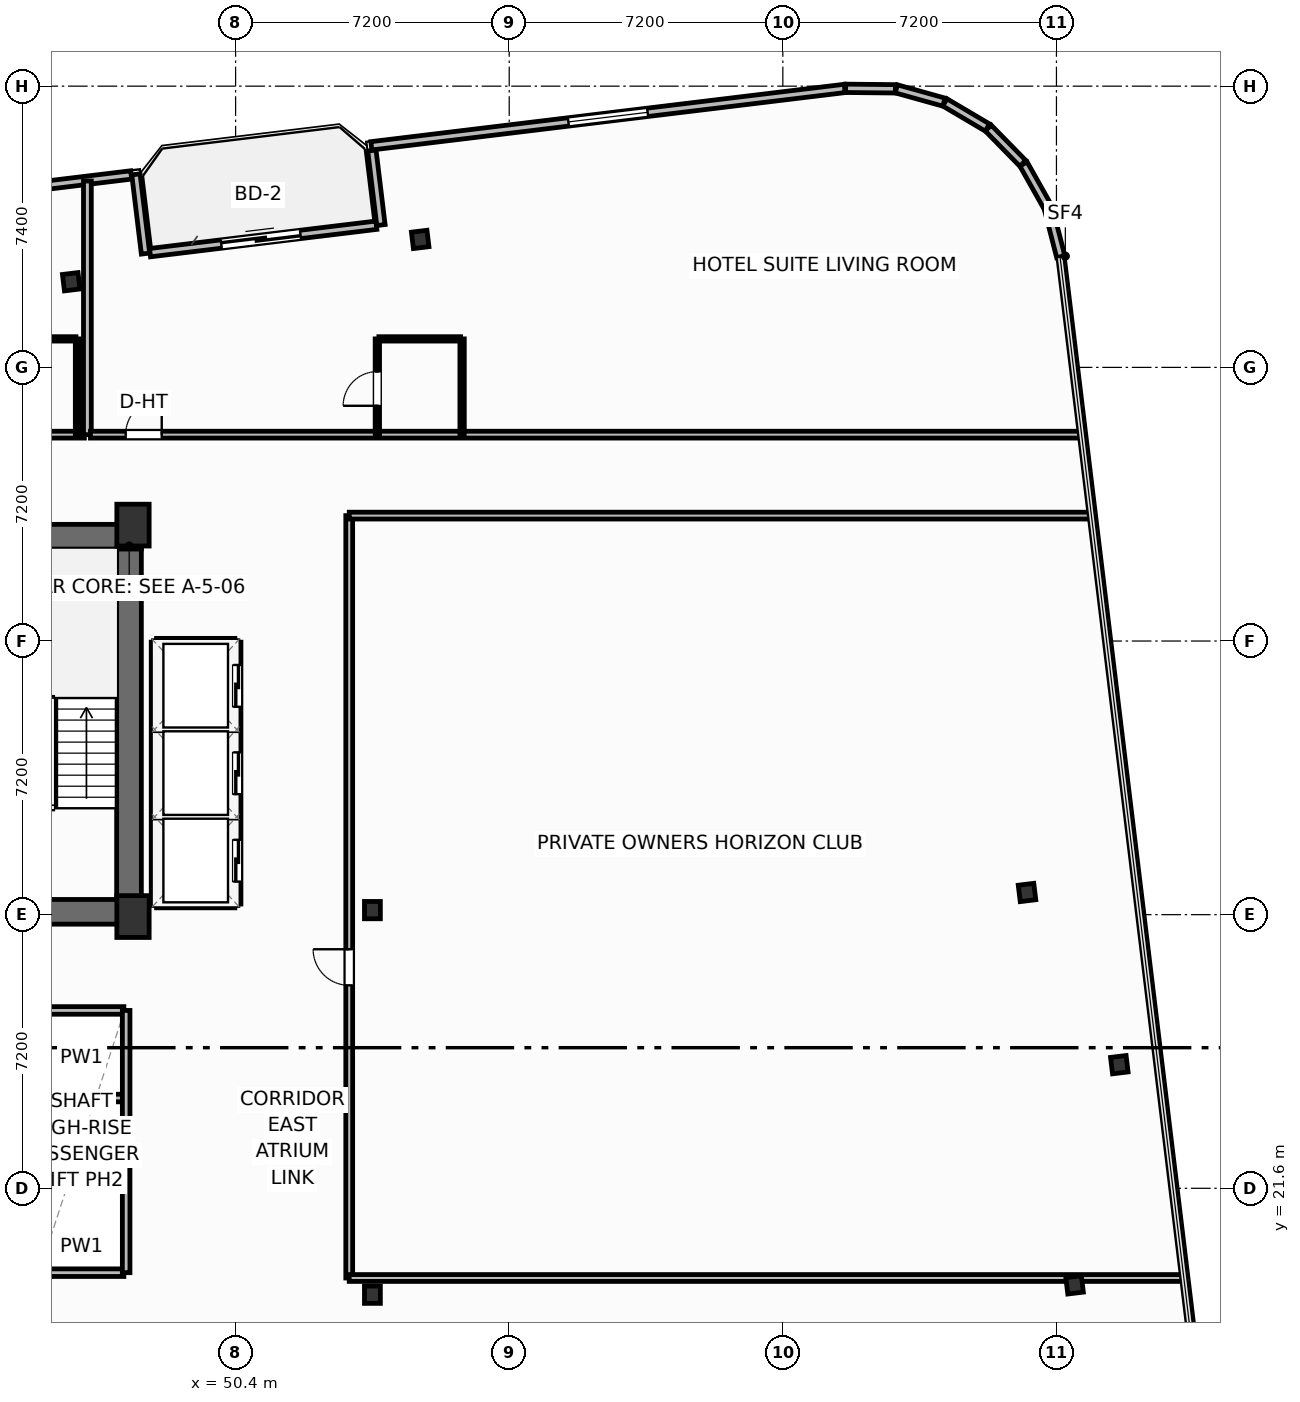
"""IFC4 building model, lengths in metres.
Left out: names, types, materials, properties, quantities, classifications, styles, units other than length and angle.
Written with IfcOpenShell. Run it as: python <this file> out.ifc"""

import sys

from ifc_helpers import new_model, si_unit, direction, frame, frame_2d, origin, origin_2d, place, context, subcontext, project, spatial, rectangle, i_section, extrude, element, fill, save


model = new_model("IFC4")
c1 = context("Model", 3, precision=1e-05, world=origin(), true_north=direction((0.0, 1.0)))
c2 = subcontext(c1, "Body", "Model", "MODEL_VIEW")
j1 = project(units=[si_unit("LENGTHUNIT", "METRE"), si_unit("PLANEANGLEUNIT", "RADIAN")], contexts=[c1])
p1 = place(None, origin())
s1 = spatial("IfcSite", under=j1, at=p1, CompositionType="ELEMENT")
p2 = place(p1, origin())
s2 = spatial("IfcBuilding", under=s1, at=p2, CompositionType="ELEMENT")
p3 = place(p2, frame((0.0, 0.0, 170.9)))
s3 = spatial("IfcBuildingStorey", under=s2, at=p3, CompositionType="ELEMENT", Elevation=170.9)
for number, where, z_axis, x_axis in (
    (1, (47.7, 28.75, 0.0), (0.0, 0.0, 1.0), (1.0, 0.0, 0.0)),
    (2, (47.7, 39.05, 0.0), (0.0, 0.0, 1.0), (1.0, 0.0, 0.0)),
):
    element("IfcColumn", number, at=place(p3, frame(where, z_axis=z_axis, x_axis=x_axis)), inside=s3, PredefinedType="COLUMN", context=c2, shape_type="SweptSolid", body=[
        extrude(rectangle(XDim=0.85, YDim=1.1, at=origin_2d()), origin(), (0.0, 0.0, 1.0), 3.7),
    ])
for number, where, z_axis, x_axis in (
    (3, (54.0, 18.8, 0.0), (0.0, 0.0, 1.0), (1.0, 0.0, 0.0)),
    (4, (54.0, 28.92, 0.0), (0.0, 0.0, 1.0), (1.0, 0.0, 0.0)),
):
    element("IfcColumn", number, at=place(p3, frame(where, z_axis=z_axis, x_axis=x_axis)), inside=s3, PredefinedType="COLUMN", context=c2, shape_type="SweptSolid", body=[
        extrude(i_section(OverallWidth=0.418, OverallDepth=0.455, WebThickness=0.042, FlangeThickness=0.068, FilletRadius=0.025, at=origin_2d()), origin(), (0.0, 0.0, 1.0), 3.7),
    ])
p4 = place(p3, frame((30.48, 38.745, 0.0), z_axis=(0.0, 0.0, 1.0), x_axis=(1.0, 0.0, 0.0)))
e5 = element("IfcWall", 5, at=p4, inside=s3, PredefinedType="SHEAR", context=c2, shape_type="SweptSolid", body=[
    extrude(rectangle(XDim=17.44, YDim=0.65, at=frame_2d((8.72, 0.0))), origin(), (0.0, 0.0, 1.0), 3.45),
])
p5 = place(p3, frame((47.595, 29.2, 0.0), z_axis=(0.0, 0.0, 1.0), x_axis=(0.0, 1.0, 0.0)))
e6 = element("IfcWall", 6, at=p5, inside=s3, PredefinedType="SHEAR", context=c2, shape_type="SweptSolid", body=[
    extrude(rectangle(XDim=9.22, YDim=0.65, at=frame_2d((4.61, 0.0))), origin(), (0.0, 0.0, 1.0), 3.45),
])
p6 = place(p3, frame((43.6, 28.875, 0.0), z_axis=(0.0, 0.0, 1.0), x_axis=(1.0, 0.0, 0.0)))
e7 = element("IfcWall", 7, at=p6, inside=s3, PredefinedType="SHEAR", context=c2, shape_type="SweptSolid", body=[
    extrude(rectangle(XDim=4.32, YDim=0.65, at=frame_2d((2.16, 0.0))), origin(), (0.0, 0.0, 1.0), 3.45),
])
for number, where, z_axis, x_axis in (
    (8, (72.477, 19.059, 0.0), (0.0, 0.0, 1.0), (0.993, 0.12, 0.0)),
    (9, (73.654, 24.853, 0.0), (0.0, 0.0, 1.0), (0.993, 0.12, 0.0)),
    (10, (71.225, 29.384, 0.0), (0.0, 0.0, 1.0), (0.993, 0.12, 0.0)),
    (11, (55.257, 46.567, 0.0), (0.0, 0.0, 1.0), (0.993, 0.12, 0.0)),
    (12, (46.075, 45.454, 0.0), (0.0, 0.0, 1.0), (0.993, 0.12, 0.0)),
):
    element("IfcColumn", number, at=place(p3, frame(where, z_axis=z_axis, x_axis=x_axis)), inside=s3, PredefinedType="COLUMN", context=c2, shape_type="SweptSolid", body=[
        extrude(i_section(OverallWidth=0.412, OverallDepth=0.435, WebThickness=0.036, FlangeThickness=0.057, FilletRadius=0.025, at=origin_2d()), origin(), (0.0, 0.0, 1.0), 3.7),
    ])
p7 = place(p3, frame((48.148, 46.219, 0.0), z_axis=(0.0, 0.0, 1.0), x_axis=(0.992729951822, 0.120362962556, 0.0)))
e13 = element("IfcWall", 13, at=p7, inside=s3, PredefinedType="SOLIDWALL", context=c2, shape_type="SweptSolid", body=[
    extrude(rectangle(XDim=6.0, YDim=0.22, at=frame_2d((3.0, 0.0))), origin(), (0.0, 0.0, 1.0), 2.73),
])
p8 = place(p7, frame((1.888, 0.0, 0.0)))
e14 = element("IfcOpeningElement", 14, at=p8, cuts=e13, PredefinedType="OPENING", context=c2, shape_type="SweptSolid", body=[
    extrude(rectangle(XDim=2.1, YDim=2.3, at=frame_2d((1.05, 1.15))), frame((0.0, 0.12, 0.0), z_axis=(0.0, -1.0, 0.0), x_axis=(1.0, 0.0, 0.0)), (0.0, 0.0, 1.0), 0.24),
])
p9 = place(p3, frame((72.114, 46.112, 0.0), z_axis=(0.0, 0.0, 1.0), x_axis=(-0.248942347653, 0.968518305219, 0.0)))
e15 = element("IfcWall", 15, at=p9, inside=s3, PredefinedType="SOLIDWALL", context=c2, shape_type="SweptSolid", body=[
    extrude(rectangle(XDim=1.326, YDim=0.22, at=frame_2d((0.663, 0.0))), origin(), (0.0, 0.0, 1.0), 2.73),
])
p10 = place(p3, frame((71.771, 47.418, 0.0), z_axis=(0.0, 0.0, 1.0), x_axis=(-0.491098509465, 0.871104043155, 0.0)))
e16 = element("IfcWall", 16, at=p10, inside=s3, PredefinedType="SOLIDWALL", context=c2, shape_type="SweptSolid", body=[
    extrude(rectangle(XDim=1.301, YDim=0.22, at=frame_2d((0.65, 0.0))), origin(), (0.0, 0.0, 1.0), 2.73),
])
p11 = place(p3, frame((71.115, 48.569, 0.0), z_axis=(0.0, 0.0, 1.0), x_axis=(-0.699844331926, 0.714295394827, 0.0)))
e17 = element("IfcWall", 17, at=p11, inside=s3, PredefinedType="SOLIDWALL", context=c2, shape_type="SweptSolid", body=[
    extrude(rectangle(XDim=1.301, YDim=0.22, at=frame_2d((0.65, 0.0))), origin(), (0.0, 0.0, 1.0), 2.73),
])
p12 = place(p3, frame((70.183, 49.511, 0.0), z_axis=(0.0, 0.0, 1.0), x_axis=(-0.860933999601, 0.508716668029, 0.0)))
e18 = element("IfcWall", 18, at=p12, inside=s3, PredefinedType="SOLIDWALL", context=c2, shape_type="SweptSolid", body=[
    extrude(rectangle(XDim=1.301, YDim=0.22, at=frame_2d((0.65, 0.0))), origin(), (0.0, 0.0, 1.0), 2.73),
])
p13 = place(p3, frame((69.039, 50.18, 0.0), z_axis=(0.0, 0.0, 1.0), x_axis=(-0.963205341366, 0.26876657226, 0.0)))
e19 = element("IfcWall", 19, at=p13, inside=s3, PredefinedType="SOLIDWALL", context=c2, shape_type="SweptSolid", body=[
    extrude(rectangle(XDim=1.301, YDim=0.22, at=frame_2d((0.65, 0.0))), origin(), (0.0, 0.0, 1.0), 2.73),
])
p14 = place(p3, frame((67.761, 50.53, 0.0), z_axis=(0.0, 0.0, 1.0), x_axis=(-0.999947358106, 0.010260653861, 0.0)))
e20 = element("IfcWall", 20, at=p14, inside=s3, PredefinedType="SOLIDWALL", context=c2, shape_type="SweptSolid", body=[
    extrude(rectangle(XDim=1.309, YDim=0.22, at=frame_2d((0.654, 0.0))), origin(), (0.0, 0.0, 1.0), 2.73),
])
p15 = place(p3, frame((66.427, 50.54, 0.0), z_axis=(0.0, 0.0, 1.0), x_axis=(-0.992731739233, -0.120348219431, 0.0)))
e21 = element("IfcWall", 21, at=p15, inside=s3, PredefinedType="SOLIDWALL", context=c2, shape_type="SweptSolid", body=[
    extrude(rectangle(XDim=12.547, YDim=0.22, at=frame_2d((6.273, 0.0))), origin(), (0.0, 0.0, 1.0), 2.73),
])
p16 = place(p15, frame((5.224, 0.0, 0.8)))
e22 = element("IfcOpeningElement", 22, at=p16, cuts=e21, PredefinedType="OPENING", context=c2, shape_type="SweptSolid", body=[
    extrude(rectangle(XDim=2.1, YDim=1.75, at=frame_2d((1.05, 0.875))), frame((0.0, 0.12, 0.0), z_axis=(0.0, -1.0, 0.0), x_axis=(1.0, 0.0, 0.0)), (0.0, 0.0, 1.0), 0.24),
])
p17 = place(p3, frame((53.987, 48.906, 0.0), z_axis=(0.0, 0.0, 1.0), x_axis=(0.120397815541, -0.992725725472, 0.0)))
e23 = element("IfcWall", 23, at=p17, inside=s3, PredefinedType="SOLIDWALL", context=c2, shape_type="SweptSolid", body=[
    extrude(rectangle(XDim=1.975, YDim=0.22, at=frame_2d((0.988, 0.0))), origin(), (0.0, 0.0, 1.0), 2.73),
])
p18 = place(p3, frame((48.03, 46.194, 0.0), z_axis=(0.0, 0.0, 1.0), x_axis=(-0.120314009587, 0.992735885871, 0.0)))
e24 = element("IfcWall", 24, at=p18, inside=s3, PredefinedType="SOLIDWALL", context=c2, shape_type="SweptSolid", body=[
    extrude(rectangle(XDim=2.1, YDim=0.22, at=frame_2d((1.05, 0.0))), origin(), (0.0, 0.0, 1.0), 2.73),
])
p19 = place(p3, frame((47.653, 48.264, 0.0), z_axis=(0.0, 0.0, 1.0), x_axis=(-0.992731032022, -0.120354052946, 0.0)))
e25 = element("IfcWall", 25, at=p19, inside=s3, PredefinedType="SOLIDWALL", context=c2, shape_type="SweptSolid", body=[
    extrude(rectangle(XDim=8.035, YDim=0.22, at=frame_2d((4.018, 0.0))), origin(), (0.0, 0.0, 1.0), 2.73),
])
p20 = place(p19, frame((2.968, 0.0, 0.8)))
e26 = element("IfcOpeningElement", 26, at=p20, cuts=e25, PredefinedType="OPENING", context=c2, shape_type="SweptSolid", body=[
    extrude(rectangle(XDim=2.1, YDim=1.75, at=frame_2d((1.05, 0.875))), frame((0.0, 0.12, 0.0), z_axis=(0.0, -1.0, 0.0), x_axis=(1.0, 0.0, 0.0)), (0.0, 0.0, 1.0), 0.24),
])
p21 = place(p3, frame((34.58, 41.43, 0.0), z_axis=(0.0, 0.0, 1.0), x_axis=(1.0, 0.0, 0.0)))
e27 = element("IfcWall", 27, at=p21, inside=s3, PredefinedType="PARTITIONING", context=c2, shape_type="SweptSolid", body=[
    extrude(rectangle(XDim=11.84, YDim=0.18, at=frame_2d((5.92, 0.0))), origin(), (0.0, 0.0, 1.0), 3.45),
])
p22 = place(p21, frame((7.68, 0.0, 0.0)))
e28 = element("IfcOpeningElement", 28, at=p22, cuts=e27, PredefinedType="OPENING", context=c2, shape_type="SweptSolid", body=[
    extrude(rectangle(XDim=0.95, YDim=2.15, at=frame_2d((0.475, 1.075))), frame((0.0, 0.1, 0.0), z_axis=(0.0, -1.0, 0.0), x_axis=(1.0, 0.0, 0.0)), (0.0, 0.0, 1.0), 0.2),
])
p23 = place(p3, frame((44.05, 43.95, 0.0), z_axis=(0.0, 0.0, 1.0), x_axis=(1.0, 0.0, 0.0)))
e29 = element("IfcWall", 29, at=p23, inside=s3, PredefinedType="PARTITIONING", context=c2, shape_type="SweptSolid", body=[
    extrude(rectangle(XDim=2.15, YDim=0.115, at=frame_2d((1.075, 0.0))), origin(), (0.0, 0.0, 1.0), 3.45),
])
p24 = place(p3, frame((46.24, 41.43, 0.0), z_axis=(0.0, 0.0, 1.0), x_axis=(0.0, 1.0, 0.0)))
e30 = element("IfcWall", 30, at=p24, inside=s3, PredefinedType="PARTITIONING", context=c2, shape_type="SweptSolid", body=[
    extrude(rectangle(XDim=2.52, YDim=0.115, at=frame_2d((1.26, 0.0))), origin(), (0.0, 0.0, 1.0), 3.45),
])
p25 = place(p3, frame((46.5, 41.43, 0.0), z_axis=(0.0, 0.0, 1.0), x_axis=(0.0, 1.0, 0.0)))
e31 = element("IfcWall", 31, at=p25, inside=s3, PredefinedType="PARTITIONING", context=c2, shape_type="SweptSolid", body=[
    extrude(rectangle(XDim=6.674, YDim=0.205, at=frame_2d((3.337, 0.0))), origin(), (0.0, 0.0, 1.0), 2.662),
])
p26 = place(p3, frame((46.58, 41.43, 0.0), z_axis=(0.0, 0.0, 1.0), x_axis=(1.0, 0.0, 0.0)))
e32 = element("IfcWall", 32, at=p26, inside=s3, PredefinedType="PARTITIONING", context=c2, shape_type="SweptSolid", body=[
    extrude(rectangle(XDim=26.042, YDim=0.18, at=frame_2d((13.021, 0.0))), origin(), (0.0, 0.0, 1.0), 3.45),
])
p27 = place(p26, frame((0.926, 0.0, 0.0)))
e33 = element("IfcOpeningElement", 33, at=p27, cuts=e32, PredefinedType="OPENING", context=c2, shape_type="SweptSolid", body=[
    extrude(rectangle(XDim=0.95, YDim=2.15, at=frame_2d((0.475, 1.075))), frame((0.0, 0.1, 0.0), z_axis=(0.0, -1.0, 0.0), x_axis=(1.0, 0.0, 0.0)), (0.0, 0.0, 1.0), 0.2),
])
p28 = place(p3, frame((54.17, 43.95, 0.0), z_axis=(0.0, 0.0, 1.0), x_axis=(1.0, 0.0, 0.0)))
e34 = element("IfcWall", 34, at=p28, inside=s3, PredefinedType="PARTITIONING", context=c2, shape_type="SweptSolid", body=[
    extrude(rectangle(XDim=2.15, YDim=0.115, at=frame_2d((1.075, 0.0))), origin(), (0.0, 0.0, 1.0), 3.45),
])
p29 = place(p3, frame((54.13, 41.43, 0.0), z_axis=(0.0, 0.0, 1.0), x_axis=(0.0, 1.0, 0.0)))
e35 = element("IfcWall", 35, at=p29, inside=s3, PredefinedType="PARTITIONING", context=c2, shape_type="SweptSolid", body=[
    extrude(rectangle(XDim=2.52, YDim=0.115, at=frame_2d((1.26, 0.0))), origin(), (0.0, 0.0, 1.0), 3.45),
])
p30 = place(p29, frame((0.76, 0.0, 0.0)))
e36 = element("IfcOpeningElement", 36, at=p30, cuts=e35, PredefinedType="OPENING", context=c2, shape_type="SweptSolid", body=[
    extrude(rectangle(XDim=0.9, YDim=2.05, at=frame_2d((0.45, 1.025))), frame((0.0, 0.067, 0.0), z_axis=(0.0, -1.0, 0.0), x_axis=(1.0, 0.0, 0.0)), (0.0, 0.0, 1.0), 0.135),
])
p31 = place(p3, frame((56.36, 41.43, 0.0), z_axis=(0.0, 0.0, 1.0), x_axis=(0.0, 1.0, 0.0)))
e37 = element("IfcWall", 37, at=p31, inside=s3, PredefinedType="PARTITIONING", context=c2, shape_type="SweptSolid", body=[
    extrude(rectangle(XDim=2.52, YDim=0.115, at=frame_2d((1.26, 0.0))), origin(), (0.0, 0.0, 1.0), 3.45),
])
p32 = place(p3, frame((53.39, 19.24, 0.0), z_axis=(0.0, 0.0, 1.0), x_axis=(0.0, 1.0, 0.0)))
e38 = element("IfcWall", 38, at=p32, inside=s3, PredefinedType="PARTITIONING", context=c2, shape_type="SweptSolid", body=[
    extrude(rectangle(XDim=20.06, YDim=0.18, at=frame_2d((10.03, 0.0))), origin(), (0.0, 0.0, 1.0), 3.45),
])
p33 = place(p32, frame((7.7, 0.0, 0.0)))
e39 = element("IfcOpeningElement", 39, at=p33, cuts=e38, PredefinedType="OPENING", context=c2, shape_type="SweptSolid", body=[
    extrude(rectangle(XDim=0.95, YDim=2.05, at=frame_2d((0.475, 1.025))), frame((0.0, 0.1, 0.0), z_axis=(0.0, -1.0, 0.0), x_axis=(1.0, 0.0, 0.0)), (0.0, 0.0, 1.0), 0.2),
])
p34 = place(p3, frame((53.39, 19.24, 0.0), z_axis=(0.0, 0.0, 1.0), x_axis=(1.0, 0.0, 0.0)))
e40 = element("IfcWall", 40, at=p34, inside=s3, PredefinedType="PARTITIONING", context=c2, shape_type="SweptSolid", body=[
    extrude(rectangle(XDim=21.922, YDim=0.18, at=frame_2d((10.961, 0.0))), origin(), (0.0, 0.0, 1.0), 2.662),
])
p35 = place(p3, frame((53.39, 39.3, 0.0), z_axis=(0.0, 0.0, 1.0), x_axis=(1.0, 0.0, 0.0)))
e41 = element("IfcWall", 41, at=p35, inside=s3, PredefinedType="PARTITIONING", context=c2, shape_type="SweptSolid", body=[
    extrude(rectangle(XDim=19.49, YDim=0.18, at=frame_2d((9.745, 0.0))), origin(), (0.0, 0.0, 1.0), 3.45),
])
for number, where, z_axis, x_axis in (
    (42, (48.32, 31.375, 0.0), (0.0, 0.0, 1.0), (1.0, 0.0, 0.0)),
    (43, (48.32, 33.675, 0.0), (0.0, 0.0, 1.0), (1.0, 0.0, 0.0)),
):
    element("IfcWall", number, at=place(p3, frame(where, z_axis=z_axis, x_axis=x_axis)), inside=s3, PredefinedType="PARTITIONING", context=c2, shape_type="SweptSolid", body=[
        extrude(rectangle(XDim=2.06, YDim=0.2, at=frame_2d((1.03, 0.0))), origin(), (0.0, 0.0, 1.0), 3.45),
    ])
p36 = place(p3, frame((48.32, 29.08, 0.0), z_axis=(0.0, 0.0, 1.0), x_axis=(1.0, 0.0, 0.0)))
e44 = element("IfcWall", 44, at=p36, inside=s3, PredefinedType="PARTITIONING", context=c2, shape_type="SweptSolid", body=[
    extrude(rectangle(XDim=2.06, YDim=0.2, at=frame_2d((1.03, 0.0))), origin(), (0.0, 0.0, 1.0), 2.662),
])
p37 = place(p3, frame((48.32, 35.97, 0.0), z_axis=(0.0, 0.0, 1.0), x_axis=(1.0, 0.0, 0.0)))
e45 = element("IfcWall", 45, at=p37, inside=s3, PredefinedType="PARTITIONING", context=c2, shape_type="SweptSolid", body=[
    extrude(rectangle(XDim=2.06, YDim=0.2, at=frame_2d((1.03, 0.0))), origin(), (0.0, 0.0, 1.0), 3.45),
])
p38 = place(p3, frame((48.28, 29.08, 0.0), z_axis=(0.0, 0.0, 1.0), x_axis=(0.0, 1.0, 0.0)))
e46 = element("IfcWall", 46, at=p38, inside=s3, PredefinedType="PARTITIONING", context=c2, shape_type="SweptSolid", body=[
    extrude(rectangle(XDim=6.89, YDim=0.2, at=frame_2d((3.445, 0.0))), origin(), (0.0, 0.0, 1.0), 3.45),
])
p39 = place(p3, frame((50.44, 29.08, 0.0), z_axis=(0.0, 0.0, 1.0), x_axis=(0.0, 1.0, 0.0)))
e47 = element("IfcWall", 47, at=p39, inside=s3, PredefinedType="PARTITIONING", context=c2, shape_type="SweptSolid", body=[
    extrude(rectangle(XDim=6.89, YDim=0.2, at=frame_2d((3.445, 0.0))), origin(), (0.0, 0.0, 1.0), 3.45),
])
p40 = place(p39, frame((0.59, 0.0, 0.0)))
e48 = element("IfcOpeningElement", 48, at=p40, cuts=e47, PredefinedType="OPENING", context=c2, shape_type="SweptSolid", body=[
    extrude(rectangle(XDim=1.1, YDim=2.15, at=frame_2d((0.55, 1.075))), frame((0.0, 0.11, 0.0), z_axis=(0.0, -1.0, 0.0), x_axis=(1.0, 0.0, 0.0)), (0.0, 0.0, 1.0), 0.22),
])
p41 = place(p39, frame((2.89, 0.0, 0.0)))
e49 = element("IfcOpeningElement", 49, at=p41, cuts=e47, PredefinedType="OPENING", context=c2, shape_type="SweptSolid", body=[
    extrude(rectangle(XDim=1.1, YDim=2.15, at=frame_2d((0.55, 1.075))), frame((0.0, 0.11, 0.0), z_axis=(0.0, -1.0, 0.0), x_axis=(1.0, 0.0, 0.0)), (0.0, 0.0, 1.0), 0.22),
])
p42 = place(p39, frame((5.19, 0.0, 0.0)))
e50 = element("IfcOpeningElement", 50, at=p42, cuts=e47, PredefinedType="OPENING", context=c2, shape_type="SweptSolid", body=[
    extrude(rectangle(XDim=1.1, YDim=2.15, at=frame_2d((0.55, 1.075))), frame((0.0, 0.11, 0.0), z_axis=(0.0, -1.0, 0.0), x_axis=(1.0, 0.0, 0.0)), (0.0, 0.0, 1.0), 0.22),
])
for number, where, z_axis, x_axis in (
    (51, (45.24, 21.675, 0.0), (0.0, 0.0, 1.0), (1.0, 0.0, 0.0)),
    (52, (45.24, 23.975, 0.0), (0.0, 0.0, 1.0), (1.0, 0.0, 0.0)),
):
    element("IfcWall", number, at=place(p3, frame(where, z_axis=z_axis, x_axis=x_axis)), inside=s3, PredefinedType="PARTITIONING", context=c2, shape_type="SweptSolid", body=[
        extrude(rectangle(XDim=2.22, YDim=0.2, at=frame_2d((1.11, 0.0))), origin(), (0.0, 0.0, 1.0), 3.45),
    ])
p43 = place(p3, frame((45.24, 19.38, 0.0), z_axis=(0.0, 0.0, 1.0), x_axis=(1.0, 0.0, 0.0)))
e53 = element("IfcWall", 53, at=p43, inside=s3, PredefinedType="PARTITIONING", context=c2, shape_type="SweptSolid", body=[
    extrude(rectangle(XDim=2.22, YDim=0.2, at=frame_2d((1.11, 0.0))), origin(), (0.0, 0.0, 1.0), 2.662),
])
p44 = place(p3, frame((45.24, 26.28, 0.0), z_axis=(0.0, 0.0, 1.0), x_axis=(1.0, 0.0, 0.0)))
e54 = element("IfcWall", 54, at=p44, inside=s3, PredefinedType="PARTITIONING", context=c2, shape_type="SweptSolid", body=[
    extrude(rectangle(XDim=2.22, YDim=0.2, at=frame_2d((1.11, 0.0))), origin(), (0.0, 0.0, 1.0), 3.45),
])
p45 = place(p3, frame((47.52, 19.38, 0.0), z_axis=(0.0, 0.0, 1.0), x_axis=(0.0, 1.0, 0.0)))
e55 = element("IfcWall", 55, at=p45, inside=s3, PredefinedType="PARTITIONING", context=c2, shape_type="SweptSolid", body=[
    extrude(rectangle(XDim=6.9, YDim=0.2, at=frame_2d((3.45, 0.0))), origin(), (0.0, 0.0, 1.0), 3.45),
])
p46 = place(p8, origin())
e56 = element("IfcDoor", 56, at=p46, inside=s3, OperationType="SLIDING_TO_LEFT", PredefinedType="DOOR", context=c2, shape_type="SweptSolid", body=[
    extrude(rectangle(XDim=2.1, YDim=2.3, at=frame_2d((1.05, 1.15))), frame((0.0, 0.025, 0.0), z_axis=(0.0, -1.0, 0.0), x_axis=(1.0, 0.0, 0.0)), (0.0, 0.0, 1.0), 0.05),
])
fill(e14, e56)
p47 = place(p16, origin())
e57 = element("IfcWindow", 57, at=p47, inside=s3, PartitioningType="SINGLE_PANEL", PredefinedType="WINDOW", context=c2, shape_type="SweptSolid", body=[
    extrude(rectangle(XDim=2.1, YDim=1.75, at=frame_2d((1.05, 0.875))), frame((0.0, 0.03, 0.0), z_axis=(0.0, -1.0, 0.0), x_axis=(1.0, 0.0, 0.0)), (0.0, 0.0, 1.0), 0.06),
])
fill(e22, e57)
p48 = place(p27, origin())
e58 = element("IfcDoor", 58, at=p48, inside=s3, OperationType="SINGLE_SWING_RIGHT", PredefinedType="DOOR", context=c2, shape_type="SweptSolid", body=[
    extrude(rectangle(XDim=0.95, YDim=2.15, at=frame_2d((0.475, 1.075))), frame((0.0, 0.025, 0.0), z_axis=(0.0, -1.0, 0.0), x_axis=(1.0, 0.0, 0.0)), (0.0, 0.0, 1.0), 0.05),
])
fill(e33, e58)
p49 = place(p30, origin())
e59 = element("IfcDoor", 59, at=p49, inside=s3, OperationType="SINGLE_SWING_LEFT", PredefinedType="DOOR", context=c2, shape_type="SweptSolid", body=[
    extrude(rectangle(XDim=0.9, YDim=2.05, at=frame_2d((0.45, 1.025))), frame((0.0, 0.025, 0.0), z_axis=(0.0, -1.0, 0.0), x_axis=(1.0, 0.0, 0.0)), (0.0, 0.0, 1.0), 0.05),
])
fill(e36, e59)
p50 = place(p33, origin())
e60 = element("IfcDoor", 60, at=p50, inside=s3, OperationType="SINGLE_SWING_RIGHT", PredefinedType="DOOR", context=c2, shape_type="SweptSolid", body=[
    extrude(rectangle(XDim=0.95, YDim=2.05, at=frame_2d((0.475, 1.025))), frame((0.0, 0.025, 0.0), z_axis=(0.0, -1.0, 0.0), x_axis=(1.0, 0.0, 0.0)), (0.0, 0.0, 1.0), 0.05),
])
fill(e39, e60)
p51 = place(p40, origin())
e61 = element("IfcDoor", 61, at=p51, inside=s3, OperationType="SLIDING_TO_LEFT", PredefinedType="DOOR", context=c2, shape_type="SweptSolid", body=[
    extrude(rectangle(XDim=1.1, YDim=2.15, at=frame_2d((0.55, 1.075))), frame((0.0, 0.025, 0.0), z_axis=(0.0, -1.0, 0.0), x_axis=(1.0, 0.0, 0.0)), (0.0, 0.0, 1.0), 0.05),
])
fill(e48, e61)
p52 = place(p41, origin())
e62 = element("IfcDoor", 62, at=p52, inside=s3, OperationType="SLIDING_TO_LEFT", PredefinedType="DOOR", context=c2, shape_type="SweptSolid", body=[
    extrude(rectangle(XDim=1.1, YDim=2.15, at=frame_2d((0.55, 1.075))), frame((0.0, 0.025, 0.0), z_axis=(0.0, -1.0, 0.0), x_axis=(1.0, 0.0, 0.0)), (0.0, 0.0, 1.0), 0.05),
])
fill(e49, e62)
p53 = place(p42, origin())
e63 = element("IfcDoor", 63, at=p53, inside=s3, OperationType="SLIDING_TO_LEFT", PredefinedType="DOOR", context=c2, shape_type="SweptSolid", body=[
    extrude(rectangle(XDim=1.1, YDim=2.15, at=frame_2d((0.55, 1.075))), frame((0.0, 0.025, 0.0), z_axis=(0.0, -1.0, 0.0), x_axis=(1.0, 0.0, 0.0)), (0.0, 0.0, 1.0), 0.05),
])
fill(e50, e63)
save(model, sys.argv[1])
